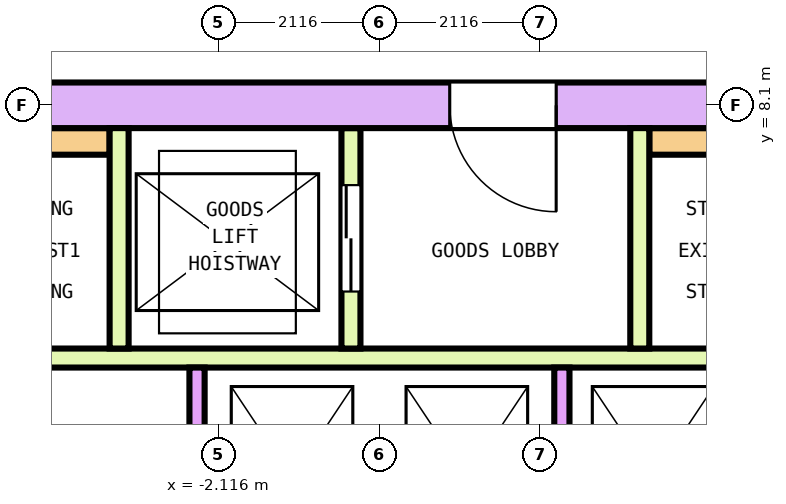
"""IFC4 building model, lengths in metres.
Left out: names, types, materials, properties, quantities, classifications, styles, units other than length and angle.
Written with IfcOpenShell. Run it as: python <this file> out.ifc"""

import sys

from ifc_helpers import new_model, si_unit, direction, frame, frame_2d, origin, place, context, subcontext, project, spatial, rectangle, extrude, element, fill, save


model = new_model("IFC4")
c1 = context("Model", 3, precision=1e-05, world=origin(), true_north=direction((0.0, 1.0)))
c2 = subcontext(c1, "Body", "Model", "MODEL_VIEW")
j1 = project(units=[si_unit("LENGTHUNIT", "METRE"), si_unit("PLANEANGLEUNIT", "RADIAN")], contexts=[c1])
p1 = place(None, origin())
s1 = spatial("IfcSite", under=j1, at=p1, CompositionType="ELEMENT")
p2 = place(p1, origin())
s2 = spatial("IfcBuilding", under=s1, at=p2, CompositionType="ELEMENT")
p3 = place(p2, frame((0.0, 0.0, 257.4)))
s3 = spatial("IfcBuildingStorey", under=s2, at=p3, CompositionType="ELEMENT", Elevation=257.4)
p4 = place(p3, frame((-9.85, 8.1, 0.0), z_axis=(0.0, 0.0, 1.0), x_axis=(1.0, 0.0, 0.0)))
e1 = element("IfcWall", 1, at=p4, inside=s3, PredefinedType="SHEAR", context=c2, shape_type="SweptSolid", body=[
    extrude(rectangle(XDim=19.7, YDim=0.6, at=frame_2d((9.85, 0.0))), origin(), (0.0, 0.0, 1.0), 5.3),
])
p5 = place(p4, frame((10.775, 0.0, 0.0)))
e2 = element("IfcOpeningElement", 2, at=p5, cuts=e1, PredefinedType="OPENING", context=c2, shape_type="SweptSolid", body=[
    extrude(rectangle(XDim=1.4, YDim=2.1, at=frame_2d((0.7, 1.05))), frame((0.0, 0.31, 0.0), z_axis=(0.0, -1.0, 0.0), x_axis=(1.0, 0.0, 0.0)), (0.0, 0.0, 1.0), 0.62),
])
p6 = place(p3, frame((-9.35, 4.775, 0.0), z_axis=(0.0, 0.0, 1.0), x_axis=(1.0, 0.0, 0.0)))
e3 = element("IfcWall", 3, at=p6, inside=s3, PredefinedType="SOLIDWALL", context=c2, shape_type="SweptSolid", body=[
    extrude(rectangle(XDim=18.7, YDim=0.25, at=frame_2d((9.35, 0.0))), origin(), (0.0, 0.0, 1.0), 5.3),
])
for number, where, z_axis, x_axis in (
    (4, (-2.4, 1.75, 0.0), (0.0, 0.0, 1.0), (0.0, 1.0, 0.0)),
    (5, (2.4, 1.75, 0.0), (0.0, 0.0, 1.0), (0.0, 1.0, 0.0)),
):
    element("IfcWall", number, at=place(p3, frame(where, z_axis=z_axis, x_axis=x_axis)), inside=s3, PredefinedType="SOLIDWALL", context=c2, shape_type="SweptSolid", body=[
        extrude(rectangle(XDim=2.9, YDim=0.2, at=frame_2d((1.45, 0.0))), origin(), (0.0, 0.0, 1.0), 5.3),
    ])
for number, where, z_axis, x_axis in (
    (6, (-9.35, 7.625, 0.0), (0.0, 0.0, 1.0), (1.0, 0.0, 0.0)),
    (7, (3.55, 7.625, 0.0), (0.0, 0.0, 1.0), (1.0, 0.0, 0.0)),
):
    element("IfcWall", number, at=place(p3, frame(where, z_axis=z_axis, x_axis=x_axis)), inside=s3, PredefinedType="SOLIDWALL", context=c2, shape_type="SweptSolid", body=[
        extrude(rectangle(XDim=5.8, YDim=0.35, at=frame_2d((2.9, 0.0))), origin(), (0.0, 0.0, 1.0), 5.3),
    ])
p7 = place(p3, frame((-3.425, 4.9, 0.0), z_axis=(0.0, 0.0, 1.0), x_axis=(0.0, 1.0, 0.0)))
e8 = element("IfcWall", 8, at=p7, inside=s3, PredefinedType="SOLIDWALL", context=c2, shape_type="SweptSolid", body=[
    extrude(rectangle(XDim=2.9, YDim=0.25, at=frame_2d((1.45, 0.0))), origin(), (0.0, 0.0, 1.0), 5.3),
])
p8 = place(p3, frame((-0.375, 4.9, 0.0), z_axis=(0.0, 0.0, 1.0), x_axis=(0.0, 1.0, 0.0)))
e9 = element("IfcWall", 9, at=p8, inside=s3, PredefinedType="SOLIDWALL", context=c2, shape_type="SweptSolid", body=[
    extrude(rectangle(XDim=2.9, YDim=0.25, at=frame_2d((1.45, 0.0))), origin(), (0.0, 0.0, 1.0), 5.3),
])
p9 = place(p8, frame((0.75, 0.0, 0.0)))
e10 = element("IfcOpeningElement", 10, at=p9, cuts=e9, PredefinedType="OPENING", context=c2, shape_type="SweptSolid", body=[
    extrude(rectangle(XDim=1.4, YDim=2.1, at=frame_2d((0.7, 1.05))), frame((0.0, 0.135, 0.0), z_axis=(0.0, -1.0, 0.0), x_axis=(1.0, 0.0, 0.0)), (0.0, 0.0, 1.0), 0.27),
])
p10 = place(p3, frame((3.425, 4.9, 0.0), z_axis=(0.0, 0.0, 1.0), x_axis=(0.0, 1.0, 0.0)))
e11 = element("IfcWall", 11, at=p10, inside=s3, PredefinedType="SOLIDWALL", context=c2, shape_type="SweptSolid", body=[
    extrude(rectangle(XDim=2.9, YDim=0.25, at=frame_2d((1.45, 0.0))), origin(), (0.0, 0.0, 1.0), 5.3),
])
p11 = place(p9, origin())
e12 = element("IfcDoor", 12, at=p11, inside=s3, OperationType="DOUBLE_DOOR_SLIDING", PredefinedType="DOOR", context=c2, shape_type="SweptSolid", body=[
    extrude(rectangle(XDim=1.4, YDim=2.1, at=frame_2d((0.7, 1.05))), frame((0.0, 0.075, 0.0), z_axis=(0.0, -1.0, 0.0), x_axis=(1.0, 0.0, 0.0)), (0.0, 0.0, 1.0), 0.15),
])
fill(e10, e12)
p12 = place(p5, origin())
e13 = element("IfcDoor", 13, at=p12, inside=s3, OperationType="DOUBLE_DOOR_SINGLE_SWING", PredefinedType="DOOR", context=c2, shape_type="SweptSolid", body=[
    extrude(rectangle(XDim=1.4, YDim=2.1, at=frame_2d((0.7, 1.05))), frame((0.0, 0.25, 0.0), z_axis=(0.0, -1.0, 0.0), x_axis=(1.0, 0.0, 0.0)), (0.0, 0.0, 1.0), 0.5),
])
fill(e2, e13)
save(model, sys.argv[1])
